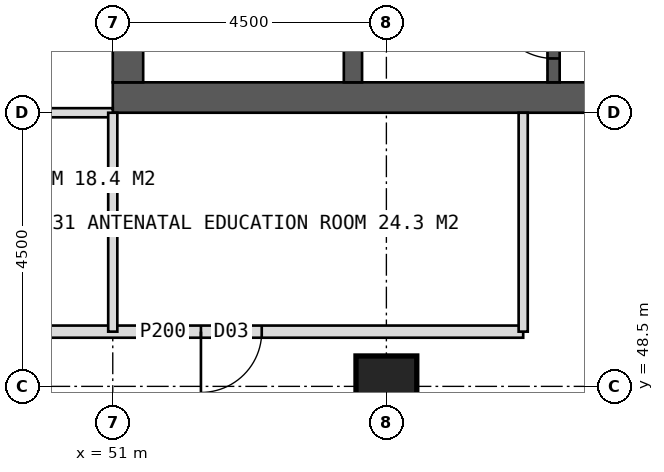
"""IFC4 building model, lengths in metres.
Left out: names, types, materials, properties, quantities, classifications, styles, units other than length and angle.
Written with IfcOpenShell. Run it as: python <this file> out.ifc"""

import sys

from ifc_helpers import new_model, si_unit, direction, frame, frame_2d, origin, origin_2d, place, context, subcontext, project, spatial, rectangle, hollow_rectangle, extrude, element, fill, save


model = new_model("IFC4")
c1 = context("Model", 3, precision=1e-05, world=origin(), true_north=direction((0.0, 1.0)))
c2 = subcontext(c1, "Body", "Model", "MODEL_VIEW")
j1 = project(units=[si_unit("LENGTHUNIT", "METRE"), si_unit("PLANEANGLEUNIT", "RADIAN")], contexts=[c1])
p1 = place(None, origin())
s1 = spatial("IfcSite", under=j1, at=p1, CompositionType="ELEMENT")
p2 = place(p1, origin())
s2 = spatial("IfcBuilding", under=s1, at=p2, CompositionType="ELEMENT")
p3 = place(p2, frame((0.0, 0.0, 185.0)))
s3 = spatial("IfcBuildingStorey", under=s2, at=p3, CompositionType="ELEMENT", Elevation=185.0)
p4 = place(p3, frame((51.0, 53.25, 0.0), z_axis=(0.0, 0.0, 1.0), x_axis=(1.0, 0.0, 0.0)))
e1 = element("IfcWall", 1, at=p4, inside=s3, PredefinedType="SHEAR", context=c2, shape_type="SweptSolid", body=[
    extrude(rectangle(XDim=18.0, YDim=0.5, at=frame_2d((9.0, 0.0))), origin(), (0.0, 0.0, 1.0), 4.0),
])
p5 = place(p4, frame((8.1, 0.0, 0.0)))
e2 = element("IfcOpeningElement", 2, at=p5, cuts=e1, PredefinedType="OPENING", context=c2, shape_type="SweptSolid", body=[
    extrude(rectangle(XDim=1.8, YDim=2.2, at=frame_2d((0.9, 1.1))), frame((0.0, 0.26, 0.0), z_axis=(0.0, -1.0, 0.0), x_axis=(1.0, 0.0, 0.0)), (0.0, 0.0, 1.0), 0.52),
])
p6 = place(p3, frame((51.25, 53.5, 0.0), z_axis=(0.0, 0.0, 1.0), x_axis=(0.0, 1.0, 0.0)))
e3 = element("IfcWall", 3, at=p6, inside=s3, PredefinedType="SHEAR", context=c2, shape_type="SweptSolid", body=[
    extrude(rectangle(XDim=17.0, YDim=0.5, at=frame_2d((8.5, 0.0))), origin(), (0.0, 0.0, 1.0), 4.0),
])
p7 = place(p6, frame((6.1, 0.0, 0.0)))
e4 = element("IfcOpeningElement", 4, at=p7, cuts=e3, PredefinedType="OPENING", context=c2, shape_type="SweptSolid", body=[
    extrude(rectangle(XDim=1.5, YDim=2.2, at=frame_2d((0.75, 1.1))), frame((0.0, 0.26, 0.0), z_axis=(0.0, -1.0, 0.0), x_axis=(1.0, 0.0, 0.0)), (0.0, 0.0, 1.0), 0.52),
])
p8 = place(p3, frame((54.95, 53.5, 0.0), z_axis=(0.0, 0.0, 1.0), x_axis=(0.0, 1.0, 0.0)))
e5 = element("IfcWall", 5, at=p8, inside=s3, PredefinedType="SHEAR", context=c2, shape_type="SweptSolid", body=[
    extrude(rectangle(XDim=17.0, YDim=0.3, at=frame_2d((8.5, 0.0))), origin(), (0.0, 0.0, 1.0), 4.0),
])
p9 = place(p3, frame((58.25, 53.5, 0.0), z_axis=(0.0, 0.0, 1.0), x_axis=(0.0, 1.0, 0.0)))
e6 = element("IfcWall", 6, at=p9, inside=s3, PredefinedType="SHEAR", context=c2, shape_type="SweptSolid", body=[
    extrude(rectangle(XDim=17.0, YDim=0.2, at=frame_2d((8.5, 0.0))), origin(), (0.0, 0.0, 1.0), 4.0),
])
p10 = place(p9, frame((0.393, 0.0, 0.0)))
e7 = element("IfcOpeningElement", 7, at=p10, cuts=e6, PredefinedType="OPENING", context=c2, shape_type="SweptSolid", body=[
    extrude(rectangle(XDim=1.0, YDim=2.1, at=frame_2d((0.5, 1.05))), frame((0.0, 0.11, 0.0), z_axis=(0.0, -1.0, 0.0), x_axis=(1.0, 0.0, 0.0)), (0.0, 0.0, 1.0), 0.22),
])
p11 = place(p9, frame((2.542, 0.0, 0.0)))
e8 = element("IfcOpeningElement", 8, at=p11, cuts=e6, PredefinedType="OPENING", context=c2, shape_type="SweptSolid", body=[
    extrude(rectangle(XDim=1.0, YDim=2.1, at=frame_2d((0.5, 1.05))), frame((0.0, 0.11, 0.0), z_axis=(0.0, -1.0, 0.0), x_axis=(1.0, 0.0, 0.0)), (0.0, 0.0, 1.0), 0.22),
])
p12 = place(p9, frame((5.127, 0.0, 0.0)))
e9 = element("IfcOpeningElement", 9, at=p12, cuts=e6, PredefinedType="OPENING", context=c2, shape_type="SweptSolid", body=[
    extrude(rectangle(XDim=1.0, YDim=2.1, at=frame_2d((0.5, 1.05))), frame((0.0, 0.11, 0.0), z_axis=(0.0, -1.0, 0.0), x_axis=(1.0, 0.0, 0.0)), (0.0, 0.0, 1.0), 0.22),
])
p13 = place(p9, frame((7.228, 0.0, 0.0)))
e10 = element("IfcOpeningElement", 10, at=p13, cuts=e6, PredefinedType="OPENING", context=c2, shape_type="SweptSolid", body=[
    extrude(rectangle(XDim=1.0, YDim=2.1, at=frame_2d((0.5, 1.05))), frame((0.0, 0.11, 0.0), z_axis=(0.0, -1.0, 0.0), x_axis=(1.0, 0.0, 0.0)), (0.0, 0.0, 1.0), 0.22),
])
p14 = place(p9, frame((10.025, 0.0, 0.0)))
e11 = element("IfcOpeningElement", 11, at=p14, cuts=e6, PredefinedType="OPENING", context=c2, shape_type="SweptSolid", body=[
    extrude(rectangle(XDim=1.4, YDim=2.2, at=frame_2d((0.7, 1.1))), frame((0.0, 0.11, 0.0), z_axis=(0.0, -1.0, 0.0), x_axis=(1.0, 0.0, 0.0)), (0.0, 0.0, 1.0), 0.22),
])
p15 = place(p9, frame((14.325, 0.0, 0.0)))
e12 = element("IfcOpeningElement", 12, at=p15, cuts=e6, PredefinedType="OPENING", context=c2, shape_type="SweptSolid", body=[
    extrude(rectangle(XDim=1.4, YDim=2.2, at=frame_2d((0.7, 1.1))), frame((0.0, 0.11, 0.0), z_axis=(0.0, -1.0, 0.0), x_axis=(1.0, 0.0, 0.0)), (0.0, 0.0, 1.0), 0.22),
])
p16 = place(p3, frame((55.5, 48.5, 0.0), z_axis=(0.0, 0.0, 1.0), x_axis=(1.0, 0.0, 0.0)))
e13 = element("IfcColumn", 13, at=p16, inside=s3, PredefinedType="COLUMN", context=c2, shape_type="SweptSolid", body=[
    extrude(hollow_rectangle(XDim=1.0, YDim=1.0, WallThickness=0.1, at=origin_2d()), origin(), (0.0, 0.0, 1.0), 4.0),
])
p17 = place(p3, frame((51.0, 53.0, 0.0), z_axis=(0.0, 0.0, 1.0), x_axis=(-1.0, 0.0, 0.0)))
e14 = element("IfcWall", 14, at=p17, inside=s3, PredefinedType="PARTITIONING", context=c2, shape_type="SweptSolid", body=[
    extrude(rectangle(XDim=5.1, YDim=0.15, at=frame_2d((2.55, 0.0))), origin(), (0.0, 0.0, 1.0), 3.75),
])
p18 = place(p3, frame((57.75, 49.4, 0.0), z_axis=(0.0, 0.0, 1.0), x_axis=(-1.0, 0.0, 0.0)))
e15 = element("IfcWall", 15, at=p18, inside=s3, PredefinedType="PARTITIONING", context=c2, shape_type="SweptSolid", body=[
    extrude(rectangle(XDim=11.85, YDim=0.2, at=frame_2d((5.925, 0.0))), origin(), (0.0, 0.0, 1.0), 3.75),
])
p19 = place(p18, frame((4.3, 0.0, 0.0)))
e16 = element("IfcOpeningElement", 16, at=p19, cuts=e15, PredefinedType="OPENING", context=c2, shape_type="SweptSolid", body=[
    extrude(rectangle(XDim=1.0, YDim=2.1, at=frame_2d((0.5, 1.05))), frame((0.0, 0.11, 0.0), z_axis=(0.0, -1.0, 0.0), x_axis=(1.0, 0.0, 0.0)), (0.0, 0.0, 1.0), 0.22),
])
p20 = place(p18, frame((8.8, 0.0, 0.0)))
e17 = element("IfcOpeningElement", 17, at=p20, cuts=e15, PredefinedType="OPENING", context=c2, shape_type="SweptSolid", body=[
    extrude(rectangle(XDim=1.0, YDim=2.1, at=frame_2d((0.5, 1.05))), frame((0.0, 0.11, 0.0), z_axis=(0.0, -1.0, 0.0), x_axis=(1.0, 0.0, 0.0)), (0.0, 0.0, 1.0), 0.22),
])
for number, where, z_axis, x_axis in (
    (18, (57.75, 53.0, 0.0), (0.0, 0.0, 1.0), (0.0, -1.0, 0.0)),
    (19, (51.0, 53.0, 0.0), (0.0, 0.0, 1.0), (0.0, -1.0, 0.0)),
):
    element("IfcWall", number, at=place(p3, frame(where, z_axis=z_axis, x_axis=x_axis)), inside=s3, PredefinedType="PARTITIONING", context=c2, shape_type="SweptSolid", body=[
        extrude(rectangle(XDim=3.6, YDim=0.15, at=frame_2d((1.8, 0.0))), origin(), (0.0, 0.0, 1.0), 3.75),
    ])
p21 = place(p19, origin())
e20 = element("IfcDoor", 20, at=p21, inside=s3, OperationType="SINGLE_SWING_RIGHT", PredefinedType="DOOR", context=c2, shape_type="SweptSolid", body=[
    extrude(rectangle(XDim=1.0, YDim=2.1, at=frame_2d((0.5, 1.05))), frame((0.0, 0.025, 0.0), z_axis=(0.0, -1.0, 0.0), x_axis=(1.0, 0.0, 0.0)), (0.0, 0.0, 1.0), 0.05),
])
fill(e16, e20)
p22 = place(p10, origin())
e21 = element("IfcDoor", 21, at=p22, inside=s3, OperationType="SINGLE_SWING_RIGHT", PredefinedType="DOOR", context=c2, shape_type="SweptSolid", body=[
    extrude(rectangle(XDim=1.0, YDim=2.1, at=frame_2d((0.5, 1.05))), frame((0.0, 0.025, 0.0), z_axis=(0.0, -1.0, 0.0), x_axis=(1.0, 0.0, 0.0)), (0.0, 0.0, 1.0), 0.05),
])
fill(e7, e21)
save(model, sys.argv[1])
